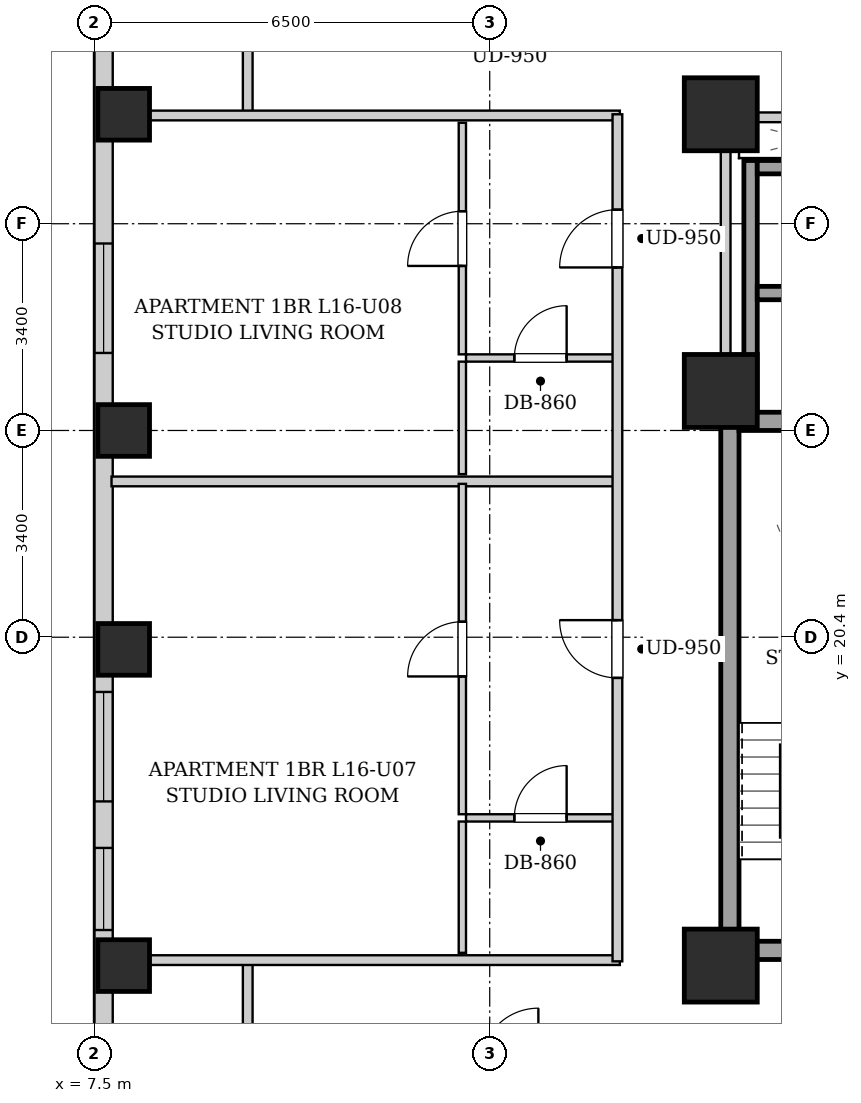
"""IFC4 building model, lengths in metres.
Left out: names, types, materials, properties, quantities, classifications, styles, units other than length and angle.
Written with IfcOpenShell. Run it as: python <this file> out.ifc"""

import sys

from ifc_helpers import new_model, si_unit, direction, frame, frame_2d, origin, origin_2d, place, context, subcontext, project, spatial, rectangle, extrude, element, fill, save


model = new_model("IFC4")
c1 = context("Model", 3, precision=1e-05, world=origin(), true_north=direction((0.0, 1.0)))
c2 = subcontext(c1, "Body", "Model", "MODEL_VIEW")
j1 = project(units=[si_unit("LENGTHUNIT", "METRE"), si_unit("PLANEANGLEUNIT", "RADIAN")], contexts=[c1])
p1 = place(None, origin())
s1 = spatial("IfcSite", under=j1, at=p1, CompositionType="ELEMENT")
p2 = place(p1, origin())
s2 = spatial("IfcBuilding", under=s1, at=p2, CompositionType="ELEMENT")
p3 = place(p2, frame((0.0, 0.0, 61.0)))
s3 = spatial("IfcBuildingStorey", under=s2, at=p3, CompositionType="ELEMENT", Elevation=61.0)
for number, where, z_axis, x_axis in (
    (1, (7.98, 15.0, 0.0), (0.0, 0.0, 1.0), (1.0, 0.0, 0.0)),
    (2, (7.98, 20.2, 0.0), (0.0, 0.0, 1.0), (1.0, 0.0, 0.0)),
    (3, (7.98, 23.8, 0.0), (0.0, 0.0, 1.0), (1.0, 0.0, 0.0)),
    (4, (7.98, 29.0, 0.0), (0.0, 0.0, 1.0), (1.0, 0.0, 0.0)),
):
    element("IfcColumn", number, at=place(p3, frame(where, z_axis=z_axis, x_axis=x_axis)), inside=s3, PredefinedType="COLUMN", context=c2, shape_type="SweptSolid", body=[
        extrude(rectangle(XDim=0.85, YDim=0.85, at=origin_2d()), origin(), (0.0, 0.0, 1.0), 3.2),
    ])
for number, where, z_axis, x_axis in (
    (5, (17.8, 15.0, 0.0), (0.0, 0.0, 1.0), (1.0, 0.0, 0.0)),
    (6, (17.8, 29.0, 0.0), (0.0, 0.0, 1.0), (1.0, 0.0, 0.0)),
    (7, (17.8, 24.45, 0.0), (0.0, 0.0, 1.0), (1.0, 0.0, 0.0)),
):
    element("IfcColumn", number, at=place(p3, frame(where, z_axis=z_axis, x_axis=x_axis)), inside=s3, PredefinedType="COLUMN", context=c2, shape_type="SweptSolid", body=[
        extrude(rectangle(XDim=1.2, YDim=1.2, at=origin_2d()), origin(), (0.0, 0.0, 1.0), 3.2),
    ])
p4 = place(p3, frame((7.65, 2.5, 0.0), z_axis=(0.0, 0.0, 1.0), x_axis=(0.0, 1.0, 0.0)))
e8 = element("IfcWall", 8, at=p4, inside=s3, PredefinedType="SOLIDWALL", context=c2, shape_type="SweptSolid", body=[
    extrude(rectangle(XDim=42.6, YDim=0.3, at=frame_2d((21.3, 0.0))), origin(), (0.0, 0.0, 1.0), 1.975),
])
p5 = place(p4, frame((3.15, 0.0, 0.55)))
e9 = element("IfcOpeningElement", 9, at=p5, cuts=e8, PredefinedType="OPENING", context=c2, shape_type="SweptSolid", body=[
    extrude(rectangle(XDim=1.8, YDim=1.2, at=frame_2d((0.9, 0.6))), frame((0.0, 0.16, 0.0), z_axis=(0.0, -1.0, 0.0), x_axis=(1.0, 0.0, 0.0)), (0.0, 0.0, 1.0), 0.32),
])
p6 = place(p4, frame((1.185, 0.0, 0.55)))
e10 = element("IfcOpeningElement", 10, at=p6, cuts=e8, PredefinedType="OPENING", context=c2, shape_type="SweptSolid", body=[
    extrude(rectangle(XDim=1.35, YDim=1.2, at=frame_2d((0.675, 0.6))), frame((0.0, 0.16, 0.0), z_axis=(0.0, -1.0, 0.0), x_axis=(1.0, 0.0, 0.0)), (0.0, 0.0, 1.0), 0.32),
])
p7 = place(p4, frame((37.085, 0.0, 0.55)))
e11 = element("IfcOpeningElement", 11, at=p7, cuts=e8, PredefinedType="OPENING", context=c2, shape_type="SweptSolid", body=[
    extrude(rectangle(XDim=1.8, YDim=1.2, at=frame_2d((0.9, 0.6))), frame((0.0, 0.16, 0.0), z_axis=(0.0, -1.0, 0.0), x_axis=(1.0, 0.0, 0.0)), (0.0, 0.0, 1.0), 0.32),
])
p8 = place(p4, frame((31.55, 0.0, 0.55)))
e12 = element("IfcOpeningElement", 12, at=p8, cuts=e8, PredefinedType="OPENING", context=c2, shape_type="SweptSolid", body=[
    extrude(rectangle(XDim=1.35, YDim=1.2, at=frame_2d((0.675, 0.6))), frame((0.0, 0.16, 0.0), z_axis=(0.0, -1.0, 0.0), x_axis=(1.0, 0.0, 0.0)), (0.0, 0.0, 1.0), 0.32),
])
p9 = place(p4, frame((15.2, 0.0, 0.55)))
e13 = element("IfcOpeningElement", 13, at=p9, cuts=e8, PredefinedType="OPENING", context=c2, shape_type="SweptSolid", body=[
    extrude(rectangle(XDim=1.8, YDim=1.2, at=frame_2d((0.9, 0.6))), frame((0.0, 0.16, 0.0), z_axis=(0.0, -1.0, 0.0), x_axis=(1.0, 0.0, 0.0)), (0.0, 0.0, 1.0), 0.32),
])
p10 = place(p4, frame((13.085, 0.0, 0.55)))
e14 = element("IfcOpeningElement", 14, at=p10, cuts=e8, PredefinedType="OPENING", context=c2, shape_type="SweptSolid", body=[
    extrude(rectangle(XDim=1.35, YDim=1.2, at=frame_2d((0.675, 0.6))), frame((0.0, 0.16, 0.0), z_axis=(0.0, -1.0, 0.0), x_axis=(1.0, 0.0, 0.0)), (0.0, 0.0, 1.0), 0.32),
])
p11 = place(p4, frame((22.575, 0.0, 0.55)))
e15 = element("IfcOpeningElement", 15, at=p11, cuts=e8, PredefinedType="OPENING", context=c2, shape_type="SweptSolid", body=[
    extrude(rectangle(XDim=1.8, YDim=1.2, at=frame_2d((0.9, 0.6))), frame((0.0, 0.16, 0.0), z_axis=(0.0, -1.0, 0.0), x_axis=(1.0, 0.0, 0.0)), (0.0, 0.0, 1.0), 0.32),
])
p12 = place(p3, frame((17.95, 15.1, 0.0), z_axis=(0.0, 0.0, 1.0), x_axis=(0.0, 1.0, 0.0)))
e16 = element("IfcWall", 16, at=p12, inside=s3, PredefinedType="SHEAR", context=c2, shape_type="SweptSolid", body=[
    extrude(rectangle(XDim=9.0, YDim=0.3, at=frame_2d((4.5, 0.0))), origin(), (0.0, 0.0, 1.0), 2.94),
])
p13 = place(p3, frame((18.1, 23.95, 0.0), z_axis=(0.0, 0.0, 1.0), x_axis=(1.0, 0.0, 0.0)))
e17 = element("IfcWall", 17, at=p13, inside=s3, PredefinedType="SHEAR", context=c2, shape_type="SweptSolid", body=[
    extrude(rectangle(XDim=2.85, YDim=0.3, at=frame_2d((1.425, 0.0))), origin(), (0.0, 0.0, 1.0), 2.94),
])
p14 = place(p3, frame((18.1, 15.25, 0.0), z_axis=(0.0, 0.0, 1.0), x_axis=(1.0, 0.0, 0.0)))
e18 = element("IfcWall", 18, at=p14, inside=s3, PredefinedType="SHEAR", context=c2, shape_type="SweptSolid", body=[
    extrude(rectangle(XDim=2.85, YDim=0.3, at=frame_2d((1.425, 0.0))), origin(), (0.0, 0.0, 1.0), 2.94),
])
p15 = place(p14, frame((0.86, 0.0, 0.0)))
e19 = element("IfcOpeningElement", 19, at=p15, cuts=e18, PredefinedType="OPENING", context=c2, shape_type="SweptSolid", body=[
    extrude(rectangle(XDim=1.1, YDim=2.05, at=frame_2d((0.55, 1.025))), frame((0.0, 0.16, 0.0), z_axis=(0.0, -1.0, 0.0), x_axis=(1.0, 0.0, 0.0)), (0.0, 0.0, 1.0), 0.32),
])
p16 = place(p3, frame((18.29, 24.1, 0.0), z_axis=(0.0, 0.0, 1.0), x_axis=(0.0, 1.0, 0.0)))
e20 = element("IfcWall", 20, at=p16, inside=s3, PredefinedType="SHEAR", context=c2, shape_type="SweptSolid", body=[
    extrude(rectangle(XDim=4.14, YDim=0.22, at=frame_2d((2.07, 0.0))), origin(), (0.0, 0.0, 1.0), 2.94),
])
for number, where, z_axis, x_axis in (
    (21, (18.4, 26.06, 0.0), (0.0, 0.0, 1.0), (1.0, 0.0, 0.0)),
    (22, (18.4, 28.13, 0.0), (0.0, 0.0, 1.0), (1.0, 0.0, 0.0)),
):
    element("IfcWall", number, at=place(p3, frame(where, z_axis=z_axis, x_axis=x_axis)), inside=s3, PredefinedType="SHEAR", context=c2, shape_type="SweptSolid", body=[
        extrude(rectangle(XDim=1.9, YDim=0.22, at=frame_2d((0.95, 0.0))), origin(), (0.0, 0.0, 1.0), 2.94),
    ])
p17 = place(p3, frame((17.88, 24.12, 0.0), z_axis=(0.0, 0.0, 1.0), x_axis=(0.0, 1.0, 0.0)))
e23 = element("IfcWall", 23, at=p17, inside=s3, PredefinedType="PARTITIONING", context=c2, shape_type="SweptSolid", body=[
    extrude(rectangle(XDim=4.76, YDim=0.16, at=frame_2d((2.38, 0.0))), origin(), (0.0, 0.0, 1.0), 2.94),
])
p18 = place(p3, frame((17.96, 28.95, 0.0), z_axis=(0.0, 0.0, 1.0), x_axis=(1.0, 0.0, 0.0)))
e24 = element("IfcWall", 24, at=p18, inside=s3, PredefinedType="PARTITIONING", context=c2, shape_type="SweptSolid", body=[
    extrude(rectangle(XDim=4.29, YDim=0.16, at=frame_2d((2.145, 0.0))), origin(), (0.0, 0.0, 1.0), 2.232),
])
p19 = place(p18, frame((1.57, 0.0, 0.0)))
e25 = element("IfcOpeningElement", 25, at=p19, cuts=e24, PredefinedType="OPENING", context=c2, shape_type="SweptSolid", body=[
    extrude(rectangle(XDim=0.86, YDim=2.05, at=frame_2d((0.43, 1.025))), frame((0.0, 0.09, 0.0), z_axis=(0.0, -1.0, 0.0), x_axis=(1.0, 0.0, 0.0)), (0.0, 0.0, 1.0), 0.18),
])
for number, where, z_axis, x_axis in (
    (26, (10.02, 13.35, 0.0), (0.0, 0.0, 1.0), (0.0, 1.0, 0.0)),
    (27, (10.02, 28.98, 0.0), (0.0, 0.0, 1.0), (0.0, 1.0, 0.0)),
):
    element("IfcWall", number, at=place(p3, frame(where, z_axis=z_axis, x_axis=x_axis)), inside=s3, PredefinedType="PARTITIONING", context=c2, shape_type="SweptSolid", body=[
        extrude(rectangle(XDim=1.74, YDim=0.16, at=frame_2d((0.87, 0.0))), origin(), (0.0, 0.0, 1.0), 2.94),
    ])
for number, where, z_axis, x_axis in (
    (28, (7.78, 15.09, 0.0), (0.0, 0.0, 1.0), (1.0, 0.0, 0.0)),
    (29, (7.78, 28.98, 0.0), (0.0, 0.0, 1.0), (1.0, 0.0, 0.0)),
):
    element("IfcWall", number, at=place(p3, frame(where, z_axis=z_axis, x_axis=x_axis)), inside=s3, PredefinedType="PARTITIONING", context=c2, shape_type="SweptSolid", body=[
        extrude(rectangle(XDim=8.36, YDim=0.16, at=frame_2d((4.18, 0.0))), origin(), (0.0, 0.0, 1.0), 2.232),
    ])
p20 = place(p3, frame((7.78, 22.962, 0.0), z_axis=(0.0, 0.0, 1.0), x_axis=(1.0, 0.0, 0.0)))
e30 = element("IfcWall", 30, at=p20, inside=s3, PredefinedType="PARTITIONING", context=c2, shape_type="SweptSolid", body=[
    extrude(rectangle(XDim=8.28, YDim=0.16, at=frame_2d((4.14, 0.0))), origin(), (0.0, 0.0, 1.0), 2.94),
])
p21 = place(p3, frame((13.61, 17.429, 0.0), z_axis=(0.0, 0.0, 1.0), x_axis=(1.0, 0.0, 0.0)))
e31 = element("IfcWall", 31, at=p21, inside=s3, PredefinedType="PARTITIONING", context=c2, shape_type="SweptSolid", body=[
    extrude(rectangle(XDim=2.45, YDim=0.12, at=frame_2d((1.225, 0.0))), origin(), (0.0, 0.0, 1.0), 2.94),
])
p22 = place(p21, frame((0.795, 0.0, 0.0)))
e32 = element("IfcOpeningElement", 32, at=p22, cuts=e31, PredefinedType="OPENING", context=c2, shape_type="SweptSolid", body=[
    extrude(rectangle(XDim=0.86, YDim=2.05, at=frame_2d((0.43, 1.025))), frame((0.0, 0.07, 0.0), z_axis=(0.0, -1.0, 0.0), x_axis=(1.0, 0.0, 0.0)), (0.0, 0.0, 1.0), 0.14),
])
p23 = place(p3, frame((13.55, 15.21, 0.0), z_axis=(0.0, 0.0, 1.0), x_axis=(0.0, 1.0, 0.0)))
e33 = element("IfcWall", 33, at=p23, inside=s3, PredefinedType="PARTITIONING", context=c2, shape_type="SweptSolid", body=[
    extrude(rectangle(XDim=2.159, YDim=0.12, at=frame_2d((1.08, 0.0))), origin(), (0.0, 0.0, 1.0), 2.94),
])
p24 = place(p3, frame((13.55, 17.489, 0.0), z_axis=(0.0, 0.0, 1.0), x_axis=(0.0, 1.0, 0.0)))
e34 = element("IfcWall", 34, at=p24, inside=s3, PredefinedType="PARTITIONING", context=c2, shape_type="SweptSolid", body=[
    extrude(rectangle(XDim=5.433, YDim=0.12, at=frame_2d((2.717, 0.0))), origin(), (0.0, 0.0, 1.0), 2.94),
])
p25 = place(p24, frame((2.266, 0.0, 0.0)))
e35 = element("IfcOpeningElement", 35, at=p25, cuts=e34, PredefinedType="OPENING", context=c2, shape_type="SweptSolid", body=[
    extrude(rectangle(XDim=0.9, YDim=2.05, at=frame_2d((0.45, 1.025))), frame((0.0, 0.07, 0.0), z_axis=(0.0, -1.0, 0.0), x_axis=(1.0, 0.0, 0.0)), (0.0, 0.0, 1.0), 0.14),
])
p26 = place(p3, frame((13.61, 24.992, 0.0), z_axis=(0.0, 0.0, 1.0), x_axis=(1.0, 0.0, 0.0)))
e36 = element("IfcWall", 36, at=p26, inside=s3, PredefinedType="PARTITIONING", context=c2, shape_type="SweptSolid", body=[
    extrude(rectangle(XDim=2.45, YDim=0.12, at=frame_2d((1.225, 0.0))), origin(), (0.0, 0.0, 1.0), 2.94),
])
p27 = place(p26, frame((0.795, 0.0, 0.0)))
e37 = element("IfcOpeningElement", 37, at=p27, cuts=e36, PredefinedType="OPENING", context=c2, shape_type="SweptSolid", body=[
    extrude(rectangle(XDim=0.86, YDim=2.05, at=frame_2d((0.43, 1.025))), frame((0.0, 0.07, 0.0), z_axis=(0.0, -1.0, 0.0), x_axis=(1.0, 0.0, 0.0)), (0.0, 0.0, 1.0), 0.14),
])
p28 = place(p3, frame((13.55, 23.082, 0.0), z_axis=(0.0, 0.0, 1.0), x_axis=(0.0, 1.0, 0.0)))
e38 = element("IfcWall", 38, at=p28, inside=s3, PredefinedType="PARTITIONING", context=c2, shape_type="SweptSolid", body=[
    extrude(rectangle(XDim=1.85, YDim=0.12, at=frame_2d((0.925, 0.0))), origin(), (0.0, 0.0, 1.0), 2.94),
])
p29 = place(p3, frame((13.55, 25.052, 0.0), z_axis=(0.0, 0.0, 1.0), x_axis=(0.0, 1.0, 0.0)))
e39 = element("IfcWall", 39, at=p29, inside=s3, PredefinedType="PARTITIONING", context=c2, shape_type="SweptSolid", body=[
    extrude(rectangle(XDim=3.808, YDim=0.12, at=frame_2d((1.904, 0.0))), origin(), (0.0, 0.0, 1.0), 2.94),
])
p30 = place(p29, frame((1.454, 0.0, 0.0)))
e40 = element("IfcOpeningElement", 40, at=p30, cuts=e39, PredefinedType="OPENING", context=c2, shape_type="SweptSolid", body=[
    extrude(rectangle(XDim=0.9, YDim=2.05, at=frame_2d((0.45, 1.025))), frame((0.0, 0.07, 0.0), z_axis=(0.0, -1.0, 0.0), x_axis=(1.0, 0.0, 0.0)), (0.0, 0.0, 1.0), 0.14),
])
p31 = place(p3, frame((16.1, 15.07, 0.0), z_axis=(0.0, 0.0, 1.0), x_axis=(0.0, 1.0, 0.0)))
e41 = element("IfcWall", 41, at=p31, inside=s3, PredefinedType="PARTITIONING", context=c2, shape_type="SweptSolid", body=[
    extrude(rectangle(XDim=13.93, YDim=0.16, at=frame_2d((6.965, 0.0))), origin(), (0.0, 0.0, 1.0), 2.94),
])
p32 = place(p31, frame((4.661, 0.0, 0.0)))
e42 = element("IfcOpeningElement", 42, at=p32, cuts=e41, PredefinedType="OPENING", context=c2, shape_type="SweptSolid", body=[
    extrude(rectangle(XDim=0.95, YDim=2.1, at=frame_2d((0.475, 1.05))), frame((0.0, 0.09, 0.0), z_axis=(0.0, -1.0, 0.0), x_axis=(1.0, 0.0, 0.0)), (0.0, 0.0, 1.0), 0.18),
])
p33 = place(p31, frame((11.411, 0.0, 0.0)))
e43 = element("IfcOpeningElement", 43, at=p33, cuts=e41, PredefinedType="OPENING", context=c2, shape_type="SweptSolid", body=[
    extrude(rectangle(XDim=0.95, YDim=2.1, at=frame_2d((0.475, 1.05))), frame((0.0, 0.09, 0.0), z_axis=(0.0, -1.0, 0.0), x_axis=(1.0, 0.0, 0.0)), (0.0, 0.0, 1.0), 0.18),
])
p34 = place(p22, origin())
e44 = element("IfcDoor", 44, at=p34, inside=s3, OperationType="SINGLE_SWING_RIGHT", PredefinedType="DOOR", context=c2, shape_type="SweptSolid", body=[
    extrude(rectangle(XDim=0.86, YDim=2.05, at=frame_2d((0.43, 1.025))), frame((0.0, 0.025, 0.0), z_axis=(0.0, -1.0, 0.0), x_axis=(1.0, 0.0, 0.0)), (0.0, 0.0, 1.0), 0.05),
])
fill(e32, e44)
p35 = place(p25, origin())
e45 = element("IfcDoor", 45, at=p35, inside=s3, OperationType="SINGLE_SWING_LEFT", PredefinedType="DOOR", context=c2, shape_type="SweptSolid", body=[
    extrude(rectangle(XDim=0.9, YDim=2.05, at=frame_2d((0.45, 1.025))), frame((0.0, 0.025, 0.0), z_axis=(0.0, -1.0, 0.0), x_axis=(1.0, 0.0, 0.0)), (0.0, 0.0, 1.0), 0.05),
])
fill(e35, e45)
p36 = place(p27, origin())
e46 = element("IfcDoor", 46, at=p36, inside=s3, OperationType="SINGLE_SWING_RIGHT", PredefinedType="DOOR", context=c2, shape_type="SweptSolid", body=[
    extrude(rectangle(XDim=0.86, YDim=2.05, at=frame_2d((0.43, 1.025))), frame((0.0, 0.025, 0.0), z_axis=(0.0, -1.0, 0.0), x_axis=(1.0, 0.0, 0.0)), (0.0, 0.0, 1.0), 0.05),
])
fill(e37, e46)
p37 = place(p30, origin())
e47 = element("IfcDoor", 47, at=p37, inside=s3, OperationType="SINGLE_SWING_LEFT", PredefinedType="DOOR", context=c2, shape_type="SweptSolid", body=[
    extrude(rectangle(XDim=0.9, YDim=2.05, at=frame_2d((0.45, 1.025))), frame((0.0, 0.025, 0.0), z_axis=(0.0, -1.0, 0.0), x_axis=(1.0, 0.0, 0.0)), (0.0, 0.0, 1.0), 0.05),
])
fill(e40, e47)
p38 = place(p32, origin())
e48 = element("IfcDoor", 48, at=p38, inside=s3, OperationType="SINGLE_SWING_RIGHT", PredefinedType="DOOR", context=c2, shape_type="SweptSolid", body=[
    extrude(rectangle(XDim=0.95, YDim=2.1, at=frame_2d((0.475, 1.05))), frame((0.0, 0.025, 0.0), z_axis=(0.0, -1.0, 0.0), x_axis=(1.0, 0.0, 0.0)), (0.0, 0.0, 1.0), 0.05),
])
fill(e42, e48)
p39 = place(p33, origin())
e49 = element("IfcDoor", 49, at=p39, inside=s3, OperationType="SINGLE_SWING_LEFT", PredefinedType="DOOR", context=c2, shape_type="SweptSolid", body=[
    extrude(rectangle(XDim=0.95, YDim=2.1, at=frame_2d((0.475, 1.05))), frame((0.0, 0.025, 0.0), z_axis=(0.0, -1.0, 0.0), x_axis=(1.0, 0.0, 0.0)), (0.0, 0.0, 1.0), 0.05),
])
fill(e43, e49)
p40 = place(p9, origin())
e50 = element("IfcWindow", 50, at=p40, inside=s3, PartitioningType="DOUBLE_PANEL_VERTICAL", PredefinedType="WINDOW", context=c2, shape_type="SweptSolid", body=[
    extrude(rectangle(XDim=1.8, YDim=1.2, at=frame_2d((0.9, 0.6))), frame((0.0, 0.03, 0.0), z_axis=(0.0, -1.0, 0.0), x_axis=(1.0, 0.0, 0.0)), (0.0, 0.0, 1.0), 0.06),
])
fill(e13, e50)
p41 = place(p10, origin())
e51 = element("IfcWindow", 51, at=p41, inside=s3, PartitioningType="SINGLE_PANEL", PredefinedType="WINDOW", context=c2, shape_type="SweptSolid", body=[
    extrude(rectangle(XDim=1.35, YDim=1.2, at=frame_2d((0.675, 0.6))), frame((0.0, 0.03, 0.0), z_axis=(0.0, -1.0, 0.0), x_axis=(1.0, 0.0, 0.0)), (0.0, 0.0, 1.0), 0.06),
])
fill(e14, e51)
p42 = place(p11, origin())
e52 = element("IfcWindow", 52, at=p42, inside=s3, PartitioningType="DOUBLE_PANEL_VERTICAL", PredefinedType="WINDOW", context=c2, shape_type="SweptSolid", body=[
    extrude(rectangle(XDim=1.8, YDim=1.2, at=frame_2d((0.9, 0.6))), frame((0.0, 0.03, 0.0), z_axis=(0.0, -1.0, 0.0), x_axis=(1.0, 0.0, 0.0)), (0.0, 0.0, 1.0), 0.06),
])
fill(e15, e52)
save(model, sys.argv[1])
